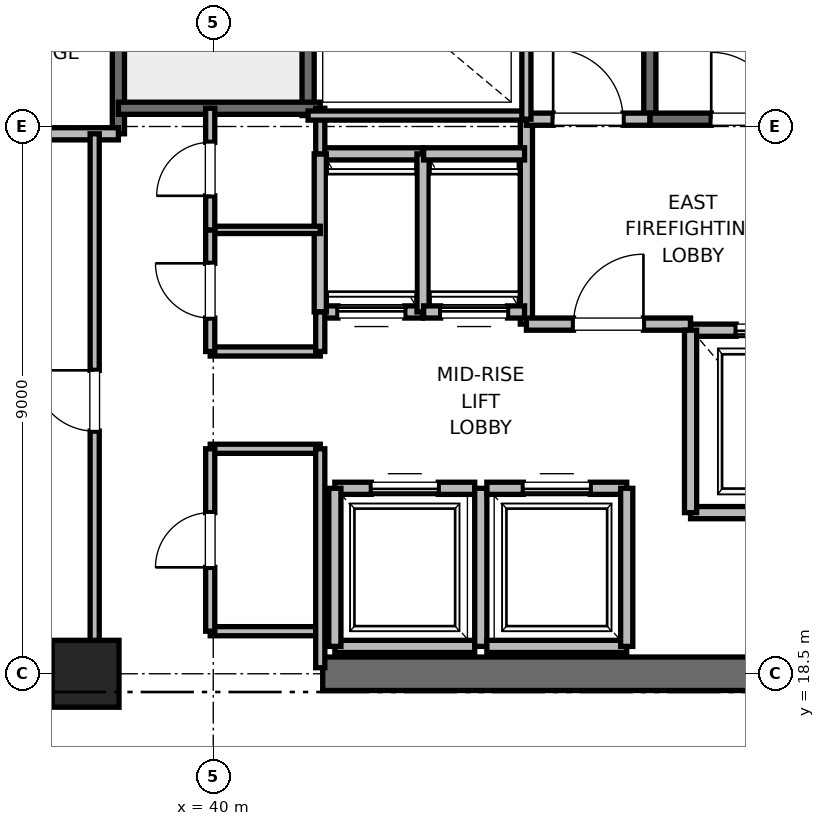
"""IFC4 building model, lengths in metres.
Left out: names, types, materials, properties, quantities, classifications, styles, units other than length and angle.
Written with IfcOpenShell. Run it as: python <this file> out.ifc"""

import sys

from ifc_helpers import new_model, si_unit, direction, frame, frame_2d, origin, origin_2d, place, context, subcontext, project, spatial, rectangle, extrude, element, fill, save


model = new_model("IFC4")
c1 = context("Model", 3, precision=1e-05, world=origin(), true_north=direction((0.0, 1.0)))
c2 = subcontext(c1, "Body", "Model", "MODEL_VIEW")
j1 = project(units=[si_unit("LENGTHUNIT", "METRE"), si_unit("PLANEANGLEUNIT", "RADIAN")], contexts=[c1])
p1 = place(None, origin())
s1 = spatial("IfcSite", under=j1, at=p1, CompositionType="ELEMENT")
p2 = place(p1, origin())
s2 = spatial("IfcBuilding", under=s1, at=p2, CompositionType="ELEMENT")
p3 = place(p2, frame((0.0, 0.0, 152.4)))
s3 = spatial("IfcBuildingStorey", under=s2, at=p3, CompositionType="ELEMENT", Elevation=152.4)
p4 = place(p3, frame((37.9, 18.5, 0.0), z_axis=(0.0, 0.0, 1.0), x_axis=(1.0, 0.0, 0.0)))
e1 = element("IfcColumn", 1, at=p4, inside=s3, PredefinedType="PILASTER", context=c2, shape_type="SweptSolid", body=[
    extrude(rectangle(XDim=1.1, YDim=1.1, at=origin_2d()), origin(), (0.0, 0.0, 1.0), 4.0),
])
for number, where, z_axis, x_axis in (
    (2, (29.0, 18.5, 0.0), (0.0, 0.0, 1.0), (1.0, 0.0, 0.0)),
    (3, (41.8, 18.5, 0.0), (0.0, 0.0, 1.0), (1.0, 0.0, 0.0)),
):
    element("IfcWall", number, at=place(p3, frame(where, z_axis=z_axis, x_axis=x_axis)), inside=s3, PredefinedType="SHEAR", context=c2, shape_type="SweptSolid", body=[
        extrude(rectangle(XDim=9.2, YDim=0.55, at=frame_2d((4.6, 0.0))), origin(), (0.0, 0.0, 1.0), 3.775),
    ])
p5 = place(p3, frame((47.18, 27.62, 0.0), z_axis=(0.0, 0.0, 1.0), x_axis=(0.0, 1.0, 0.0)))
e4 = element("IfcWall", 4, at=p5, inside=s3, PredefinedType="SOLIDWALL", context=c2, shape_type="SweptSolid", body=[
    extrude(rectangle(XDim=8.18, YDim=0.2, at=frame_2d((4.09, 0.0))), origin(), (0.0, 0.0, 1.0), 3.775),
])
p6 = place(p3, frame((47.18, 27.62, 0.0), z_axis=(0.0, 0.0, 1.0), x_axis=(1.0, 0.0, 0.0)))
e5 = element("IfcWall", 5, at=p6, inside=s3, PredefinedType="SOLIDWALL", context=c2, shape_type="SweptSolid", body=[
    extrude(rectangle(XDim=3.12, YDim=0.2, at=frame_2d((1.56, 0.0))), origin(), (0.0, 0.0, 1.0), 3.775),
])
p7 = place(p6, frame((1.01, 0.0, 0.0)))
e6 = element("IfcOpeningElement", 6, at=p7, cuts=e5, PredefinedType="OPENING", context=c2, shape_type="SweptSolid", body=[
    extrude(rectangle(XDim=1.1, YDim=2.15, at=frame_2d((0.55, 1.075))), frame((0.0, 0.1, 0.0), z_axis=(0.0, -1.0, 0.0), x_axis=(1.0, 0.0, 0.0)), (0.0, 0.0, 1.0), 0.2),
])
p8 = place(p3, frame((38.44, 27.38, 0.0), z_axis=(0.0, 0.0, 1.0), x_axis=(0.0, 1.0, 0.0)))
e7 = element("IfcWall", 7, at=p8, inside=s3, PredefinedType="SOLIDWALL", context=c2, shape_type="SweptSolid", body=[
    extrude(rectangle(XDim=8.87, YDim=0.2, at=frame_2d((4.435, 0.0))), origin(), (0.0, 0.0, 1.0), 3.775),
])
p9 = place(p3, frame((41.56, 27.68, 0.0), z_axis=(0.0, 0.0, 1.0), x_axis=(0.0, 1.0, 0.0)))
e8 = element("IfcWall", 8, at=p9, inside=s3, PredefinedType="SOLIDWALL", context=c2, shape_type="SweptSolid", body=[
    extrude(rectangle(XDim=8.57, YDim=0.2, at=frame_2d((4.285, 0.0))), origin(), (0.0, 0.0, 1.0), 3.775),
])
p10 = place(p3, frame((38.44, 27.8, 0.0), z_axis=(0.0, 0.0, 1.0), x_axis=(1.0, 0.0, 0.0)))
e9 = element("IfcWall", 9, at=p10, inside=s3, PredefinedType="SOLIDWALL", context=c2, shape_type="SweptSolid", body=[
    extrude(rectangle(XDim=3.32, YDim=0.2, at=frame_2d((1.66, 0.0))), origin(), (0.0, 0.0, 1.0), 3.775),
])
p11 = place(p3, frame((32.82, 27.38, 0.0), z_axis=(0.0, 0.0, 1.0), x_axis=(1.0, 0.0, 0.0)))
e10 = element("IfcWall", 10, at=p11, inside=s3, PredefinedType="PARTITIONING", context=c2, shape_type="SweptSolid", body=[
    extrude(rectangle(XDim=5.62, YDim=0.2, at=frame_2d((2.81, 0.0))), origin(), (0.0, 0.0, 1.0), 3.775),
])
p12 = place(p3, frame((45.15, 24.25, 0.0), z_axis=(0.0, 0.0, 1.0), x_axis=(0.0, 1.0, 0.0)))
e11 = element("IfcWall", 11, at=p12, inside=s3, PredefinedType="PARTITIONING", context=c2, shape_type="SweptSolid", body=[
    extrude(rectangle(XDim=3.37, YDim=0.2, at=frame_2d((1.685, 0.0))), origin(), (0.0, 0.0, 1.0), 3.775),
])
p13 = place(p3, frame((45.15, 24.25, 0.0), z_axis=(0.0, 0.0, 1.0), x_axis=(1.0, 0.0, 0.0)))
e12 = element("IfcWall", 12, at=p13, inside=s3, PredefinedType="PARTITIONING", context=c2, shape_type="SweptSolid", body=[
    extrude(rectangle(XDim=2.7, YDim=0.2, at=frame_2d((1.35, 0.0))), origin(), (0.0, 0.0, 1.0), 3.775),
])
p14 = place(p13, frame((0.775, 0.0, 0.0)))
e13 = element("IfcOpeningElement", 13, at=p14, cuts=e12, PredefinedType="OPENING", context=c2, shape_type="SweptSolid", body=[
    extrude(rectangle(XDim=1.15, YDim=2.2, at=frame_2d((0.575, 1.1))), frame((0.0, 0.1, 0.0), z_axis=(0.0, -1.0, 0.0), x_axis=(1.0, 0.0, 0.0)), (0.0, 0.0, 1.0), 0.2),
])
p15 = place(p3, frame((45.15, 27.62, 0.0), z_axis=(0.0, 0.0, 1.0), x_axis=(1.0, 0.0, 0.0)))
e14 = element("IfcWall", 14, at=p15, inside=s3, PredefinedType="PARTITIONING", context=c2, shape_type="SweptSolid", body=[
    extrude(rectangle(XDim=2.03, YDim=0.2, at=frame_2d((1.015, 0.0))), origin(), (0.0, 0.0, 1.0), 3.775),
])
p16 = place(p15, frame((0.44, 0.0, 0.0)))
e15 = element("IfcOpeningElement", 15, at=p16, cuts=e14, PredefinedType="OPENING", context=c2, shape_type="SweptSolid", body=[
    extrude(rectangle(XDim=1.15, YDim=2.2, at=frame_2d((0.575, 1.1))), frame((0.0, 0.1, 0.0), z_axis=(0.0, -1.0, 0.0), x_axis=(1.0, 0.0, 0.0)), (0.0, 0.0, 1.0), 0.2),
])
p17 = place(p3, frame((47.85, 21.15, 0.0), z_axis=(0.0, 0.0, 1.0), x_axis=(1.0, 0.0, 0.0)))
e16 = element("IfcWall", 16, at=p17, inside=s3, PredefinedType="SOLIDWALL", context=c2, shape_type="SweptSolid", body=[
    extrude(rectangle(XDim=2.6, YDim=0.2, at=frame_2d((1.3, 0.0))), origin(), (0.0, 0.0, 1.0), 3.775),
])
p18 = place(p3, frame((50.45, 24.15, 0.0), z_axis=(0.0, 0.0, 1.0), x_axis=(-1.0, 0.0, 0.0)))
e17 = element("IfcWall", 17, at=p18, inside=s3, PredefinedType="SOLIDWALL", context=c2, shape_type="SweptSolid", body=[
    extrude(rectangle(XDim=2.6, YDim=0.2, at=frame_2d((1.3, 0.0))), origin(), (0.0, 0.0, 1.0), 2.755),
])
p19 = place(p18, frame((0.75, 0.0, 0.0)))
e18 = element("IfcOpeningElement", 18, at=p19, cuts=e17, PredefinedType="OPENING", context=c2, shape_type="SweptSolid", body=[
    extrude(rectangle(XDim=1.1, YDim=2.2, at=frame_2d((0.55, 1.1))), frame((0.0, 0.1, 0.0), z_axis=(0.0, -1.0, 0.0), x_axis=(1.0, 0.0, 0.0)), (0.0, 0.0, 1.0), 0.2),
])
p20 = place(p3, frame((47.85, 24.15, 0.0), z_axis=(0.0, 0.0, 1.0), x_axis=(0.0, -1.0, 0.0)))
e19 = element("IfcWall", 19, at=p20, inside=s3, PredefinedType="SOLIDWALL", context=c2, shape_type="SweptSolid", body=[
    extrude(rectangle(XDim=3.0, YDim=0.2, at=frame_2d((1.5, 0.0))), origin(), (0.0, 0.0, 1.0), 3.775),
])
p21 = place(p3, frame((42.0, 18.95, 0.0), z_axis=(0.0, 0.0, 1.0), x_axis=(1.0, 0.0, 0.0)))
e20 = element("IfcWall", 20, at=p21, inside=s3, PredefinedType="SOLIDWALL", context=c2, shape_type="SweptSolid", body=[
    extrude(rectangle(XDim=2.3, YDim=0.2, at=frame_2d((1.15, 0.0))), origin(), (0.0, 0.0, 1.0), 2.755),
])
p22 = place(p3, frame((44.3, 21.55, 0.0), z_axis=(0.0, 0.0, 1.0), x_axis=(-1.0, 0.0, 0.0)))
e21 = element("IfcWall", 21, at=p22, inside=s3, PredefinedType="SOLIDWALL", context=c2, shape_type="SweptSolid", body=[
    extrude(rectangle(XDim=2.3, YDim=0.2, at=frame_2d((1.15, 0.0))), origin(), (0.0, 0.0, 1.0), 3.775),
])
p23 = place(p22, frame((0.6, 0.0, 0.0)))
e22 = element("IfcOpeningElement", 22, at=p23, cuts=e21, PredefinedType="OPENING", context=c2, shape_type="SweptSolid", body=[
    extrude(rectangle(XDim=1.1, YDim=2.2, at=frame_2d((0.55, 1.1))), frame((0.0, 0.1, 0.0), z_axis=(0.0, -1.0, 0.0), x_axis=(1.0, 0.0, 0.0)), (0.0, 0.0, 1.0), 0.2),
])
p24 = place(p3, frame((42.0, 21.55, 0.0), z_axis=(0.0, 0.0, 1.0), x_axis=(0.0, -1.0, 0.0)))
e23 = element("IfcWall", 23, at=p24, inside=s3, PredefinedType="SOLIDWALL", context=c2, shape_type="SweptSolid", body=[
    extrude(rectangle(XDim=2.6, YDim=0.2, at=frame_2d((1.3, 0.0))), origin(), (0.0, 0.0, 1.0), 2.755),
])
p25 = place(p3, frame((44.4, 18.95, 0.0), z_axis=(0.0, 0.0, 1.0), x_axis=(0.0, 1.0, 0.0)))
e24 = element("IfcWall", 24, at=p25, inside=s3, PredefinedType="SOLIDWALL", context=c2, shape_type="SweptSolid", body=[
    extrude(rectangle(XDim=2.6, YDim=0.2, at=frame_2d((1.3, 0.0))), origin(), (0.0, 0.0, 1.0), 3.775),
])
p26 = place(p3, frame((44.5, 18.95, 0.0), z_axis=(0.0, 0.0, 1.0), x_axis=(1.0, 0.0, 0.0)))
e25 = element("IfcWall", 25, at=p26, inside=s3, PredefinedType="SOLIDWALL", context=c2, shape_type="SweptSolid", body=[
    extrude(rectangle(XDim=2.3, YDim=0.2, at=frame_2d((1.15, 0.0))), origin(), (0.0, 0.0, 1.0), 3.775),
])
p27 = place(p3, frame((46.8, 21.55, 0.0), z_axis=(0.0, 0.0, 1.0), x_axis=(-1.0, 0.0, 0.0)))
e26 = element("IfcWall", 26, at=p27, inside=s3, PredefinedType="SOLIDWALL", context=c2, shape_type="SweptSolid", body=[
    extrude(rectangle(XDim=2.3, YDim=0.2, at=frame_2d((1.15, 0.0))), origin(), (0.0, 0.0, 1.0), 3.775),
])
p28 = place(p27, frame((0.6, 0.0, 0.0)))
e27 = element("IfcOpeningElement", 27, at=p28, cuts=e26, PredefinedType="OPENING", context=c2, shape_type="SweptSolid", body=[
    extrude(rectangle(XDim=1.1, YDim=2.2, at=frame_2d((0.55, 1.1))), frame((0.0, 0.1, 0.0), z_axis=(0.0, -1.0, 0.0), x_axis=(1.0, 0.0, 0.0)), (0.0, 0.0, 1.0), 0.2),
])
p29 = place(p3, frame((46.8, 18.95, 0.0), z_axis=(0.0, 0.0, 1.0), x_axis=(0.0, 1.0, 0.0)))
e28 = element("IfcWall", 28, at=p29, inside=s3, PredefinedType="SOLIDWALL", context=c2, shape_type="SweptSolid", body=[
    extrude(rectangle(XDim=2.6, YDim=0.2, at=frame_2d((1.3, 0.0))), origin(), (0.0, 0.0, 1.0), 3.775),
])
p30 = place(p3, frame((41.76, 24.45, 0.0), z_axis=(0.0, 0.0, 1.0), x_axis=(1.0, 0.0, 0.0)))
e29 = element("IfcWall", 29, at=p30, inside=s3, PredefinedType="SOLIDWALL", context=c2, shape_type="SweptSolid", body=[
    extrude(rectangle(XDim=1.68, YDim=0.2, at=frame_2d((0.84, 0.0))), origin(), (0.0, 0.0, 1.0), 3.775),
])
p31 = place(p30, frame((0.29, 0.0, 0.0)))
e30 = element("IfcOpeningElement", 30, at=p31, cuts=e29, PredefinedType="OPENING", context=c2, shape_type="SweptSolid", body=[
    extrude(rectangle(XDim=1.1, YDim=2.2, at=frame_2d((0.55, 1.1))), frame((0.0, 0.1, 0.0), z_axis=(0.0, -1.0, 0.0), x_axis=(1.0, 0.0, 0.0)), (0.0, 0.0, 1.0), 0.2),
])
p32 = place(p3, frame((43.44, 27.05, 0.0), z_axis=(0.0, 0.0, 1.0), x_axis=(-1.0, 0.0, 0.0)))
e31 = element("IfcWall", 31, at=p32, inside=s3, PredefinedType="SOLIDWALL", context=c2, shape_type="SweptSolid", body=[
    extrude(rectangle(XDim=1.68, YDim=0.2, at=frame_2d((0.84, 0.0))), origin(), (0.0, 0.0, 1.0), 3.775),
])
for number, where, z_axis, x_axis in (
    (32, (41.76, 27.05, 0.0), (0.0, 0.0, 1.0), (0.0, -1.0, 0.0)),
    (33, (43.45, 24.45, 0.0), (0.0, 0.0, 1.0), (0.0, 1.0, 0.0)),
):
    element("IfcWall", number, at=place(p3, frame(where, z_axis=z_axis, x_axis=x_axis)), inside=s3, PredefinedType="SOLIDWALL", context=c2, shape_type="SweptSolid", body=[
        extrude(rectangle(XDim=2.6, YDim=0.2, at=frame_2d((1.3, 0.0))), origin(), (0.0, 0.0, 1.0), 3.775),
    ])
p33 = place(p3, frame((43.46, 24.45, 0.0), z_axis=(0.0, 0.0, 1.0), x_axis=(1.0, 0.0, 0.0)))
e34 = element("IfcWall", 34, at=p33, inside=s3, PredefinedType="SOLIDWALL", context=c2, shape_type="SweptSolid", body=[
    extrude(rectangle(XDim=1.66, YDim=0.2, at=frame_2d((0.83, 0.0))), origin(), (0.0, 0.0, 1.0), 3.775),
])
p34 = place(p33, frame((0.28, 0.0, 0.0)))
e35 = element("IfcOpeningElement", 35, at=p34, cuts=e34, PredefinedType="OPENING", context=c2, shape_type="SweptSolid", body=[
    extrude(rectangle(XDim=1.1, YDim=2.2, at=frame_2d((0.55, 1.1))), frame((0.0, 0.1, 0.0), z_axis=(0.0, -1.0, 0.0), x_axis=(1.0, 0.0, 0.0)), (0.0, 0.0, 1.0), 0.2),
])
p35 = place(p3, frame((45.12, 27.05, 0.0), z_axis=(0.0, 0.0, 1.0), x_axis=(-1.0, 0.0, 0.0)))
e36 = element("IfcWall", 36, at=p35, inside=s3, PredefinedType="SOLIDWALL", context=c2, shape_type="SweptSolid", body=[
    extrude(rectangle(XDim=1.66, YDim=0.2, at=frame_2d((0.83, 0.0))), origin(), (0.0, 0.0, 1.0), 3.775),
])
for number, where, z_axis, x_axis in (
    (37, (39.95, 19.2, 0.0), (0.0, 0.0, 1.0), (1.0, 0.0, 0.0)),
    (38, (39.95, 22.2, 0.0), (0.0, 0.0, 1.0), (1.0, 0.0, 0.0)),
    (39, (39.95, 23.8, 0.0), (0.0, 0.0, 1.0), (1.0, 0.0, 0.0)),
):
    element("IfcWall", number, at=place(p3, frame(where, z_axis=z_axis, x_axis=x_axis)), inside=s3, PredefinedType="PARTITIONING", context=c2, shape_type="SweptSolid", body=[
        extrude(rectangle(XDim=1.81, YDim=0.15, at=frame_2d((0.905, 0.0))), origin(), (0.0, 0.0, 1.0), 2.85),
    ])
p36 = place(p3, frame((39.95, 25.8, 0.0), z_axis=(0.0, 0.0, 1.0), x_axis=(1.0, 0.0, 0.0)))
e40 = element("IfcWall", 40, at=p36, inside=s3, PredefinedType="PARTITIONING", context=c2, shape_type="SweptSolid", body=[
    extrude(rectangle(XDim=1.81, YDim=0.12, at=frame_2d((0.905, 0.0))), origin(), (0.0, 0.0, 1.0), 2.85),
])
p37 = place(p3, frame((41.76, 18.6, 0.0), z_axis=(0.0, 0.0, 1.0), x_axis=(0.0, 1.0, 0.0)))
e41 = element("IfcWall", 41, at=p37, inside=s3, PredefinedType="PARTITIONING", context=c2, shape_type="SweptSolid", body=[
    extrude(rectangle(XDim=3.6, YDim=0.15, at=frame_2d((1.8, 0.0))), origin(), (0.0, 0.0, 1.0), 2.755),
])
p38 = place(p3, frame((41.76, 23.8, 0.0), z_axis=(0.0, 0.0, 1.0), x_axis=(0.0, 1.0, 0.0)))
e42 = element("IfcWall", 42, at=p38, inside=s3, PredefinedType="PARTITIONING", context=c2, shape_type="SweptSolid", body=[
    extrude(rectangle(XDim=0.65, YDim=0.15, at=frame_2d((0.325, 0.0))), origin(), (0.0, 0.0, 1.0), 2.85),
])
p39 = place(p3, frame((41.76, 27.05, 0.0), z_axis=(0.0, 0.0, 1.0), x_axis=(0.0, 1.0, 0.0)))
e43 = element("IfcWall", 43, at=p39, inside=s3, PredefinedType="PARTITIONING", context=c2, shape_type="SweptSolid", body=[
    extrude(rectangle(XDim=0.75, YDim=0.15, at=frame_2d((0.375, 0.0))), origin(), (0.0, 0.0, 1.0), 2.85),
])
p40 = place(p3, frame((39.95, 19.2, 0.0), z_axis=(0.0, 0.0, 1.0), x_axis=(0.0, 1.0, 0.0)))
e44 = element("IfcWall", 44, at=p40, inside=s3, PredefinedType="PARTITIONING", context=c2, shape_type="SweptSolid", body=[
    extrude(rectangle(XDim=3.0, YDim=0.15, at=frame_2d((1.5, 0.0))), origin(), (0.0, 0.0, 1.0), 2.85),
])
p41 = place(p40, frame((1.05, 0.0, 0.0)))
e45 = element("IfcOpeningElement", 45, at=p41, cuts=e44, PredefinedType="OPENING", context=c2, shape_type="SweptSolid", body=[
    extrude(rectangle(XDim=0.9, YDim=2.1, at=frame_2d((0.45, 1.05))), frame((0.0, 0.075, 0.0), z_axis=(0.0, -1.0, 0.0), x_axis=(1.0, 0.0, 0.0)), (0.0, 0.0, 1.0), 0.15),
])
p42 = place(p3, frame((39.95, 23.8, 0.0), z_axis=(0.0, 0.0, 1.0), x_axis=(0.0, 1.0, 0.0)))
e46 = element("IfcWall", 46, at=p42, inside=s3, PredefinedType="PARTITIONING", context=c2, shape_type="SweptSolid", body=[
    extrude(rectangle(XDim=2.0, YDim=0.15, at=frame_2d((1.0, 0.0))), origin(), (0.0, 0.0, 1.0), 2.85),
])
p43 = place(p42, frame((0.55, 0.0, 0.0)))
e47 = element("IfcOpeningElement", 47, at=p43, cuts=e46, PredefinedType="OPENING", context=c2, shape_type="SweptSolid", body=[
    extrude(rectangle(XDim=0.9, YDim=2.1, at=frame_2d((0.45, 1.05))), frame((0.0, 0.075, 0.0), z_axis=(0.0, -1.0, 0.0), x_axis=(1.0, 0.0, 0.0)), (0.0, 0.0, 1.0), 0.15),
])
p44 = place(p3, frame((39.95, 25.8, 0.0), z_axis=(0.0, 0.0, 1.0), x_axis=(0.0, 1.0, 0.0)))
e48 = element("IfcWall", 48, at=p44, inside=s3, PredefinedType="PARTITIONING", context=c2, shape_type="SweptSolid", body=[
    extrude(rectangle(XDim=2.0, YDim=0.15, at=frame_2d((1.0, 0.0))), origin(), (0.0, 0.0, 1.0), 2.85),
])
p45 = place(p44, frame((0.56, 0.0, 0.0)))
e49 = element("IfcOpeningElement", 49, at=p45, cuts=e48, PredefinedType="OPENING", context=c2, shape_type="SweptSolid", body=[
    extrude(rectangle(XDim=0.88, YDim=2.1, at=frame_2d((0.44, 1.05))), frame((0.0, 0.075, 0.0), z_axis=(0.0, -1.0, 0.0), x_axis=(1.0, 0.0, 0.0)), (0.0, 0.0, 1.0), 0.15),
])
p46 = place(p3, frame((38.05, 18.6, 0.0), z_axis=(0.0, 0.0, 1.0), x_axis=(0.0, 1.0, 0.0)))
e50 = element("IfcWall", 50, at=p46, inside=s3, PredefinedType="PARTITIONING", context=c2, shape_type="SweptSolid", body=[
    extrude(rectangle(XDim=8.78, YDim=0.15, at=frame_2d((4.39, 0.0))), origin(), (0.0, 0.0, 1.0), 2.755),
])
p47 = place(p46, frame((3.89, 0.0, 0.0)))
e51 = element("IfcOpeningElement", 51, at=p47, cuts=e50, PredefinedType="OPENING", context=c2, shape_type="SweptSolid", body=[
    extrude(rectangle(XDim=1.0, YDim=2.15, at=frame_2d((0.5, 1.075))), frame((0.0, 0.075, 0.0), z_axis=(0.0, -1.0, 0.0), x_axis=(1.0, 0.0, 0.0)), (0.0, 0.0, 1.0), 0.15),
])
p48 = place(p3, frame((41.56, 27.68, 0.0), z_axis=(0.0, 0.0, 1.0), x_axis=(1.0, 0.0, 0.0)))
e52 = element("IfcWall", 52, at=p48, inside=s3, PredefinedType="PARTITIONING", context=c2, shape_type="SweptSolid", body=[
    extrude(rectangle(XDim=3.59, YDim=0.15, at=frame_2d((1.795, 0.0))), origin(), (0.0, 0.0, 1.0), 2.85),
])
p49 = place(p3, frame((45.15, 27.62, 0.0), z_axis=(0.0, 0.0, 1.0), x_axis=(0.0, 1.0, 0.0)))
e53 = element("IfcWall", 53, at=p49, inside=s3, PredefinedType="PARTITIONING", context=c2, shape_type="SweptSolid", body=[
    extrude(rectangle(XDim=3.1, YDim=0.15, at=frame_2d((1.55, 0.0))), origin(), (0.0, 0.0, 1.0), 2.85),
])
p50 = place(p7, origin())
e54 = element("IfcDoor", 54, at=p50, inside=s3, OperationType="SINGLE_SWING_LEFT", PredefinedType="DOOR", context=c2, shape_type="SweptSolid", body=[
    extrude(rectangle(XDim=1.1, YDim=2.15, at=frame_2d((0.55, 1.075))), frame((0.0, 0.025, 0.0), z_axis=(0.0, -1.0, 0.0), x_axis=(1.0, 0.0, 0.0)), (0.0, 0.0, 1.0), 0.05),
])
fill(e6, e54)
p51 = place(p14, origin())
e55 = element("IfcDoor", 55, at=p51, inside=s3, OperationType="SINGLE_SWING_RIGHT", PredefinedType="DOOR", context=c2, shape_type="SweptSolid", body=[
    extrude(rectangle(XDim=1.15, YDim=2.2, at=frame_2d((0.575, 1.1))), frame((0.0, 0.025, 0.0), z_axis=(0.0, -1.0, 0.0), x_axis=(1.0, 0.0, 0.0)), (0.0, 0.0, 1.0), 0.05),
])
fill(e13, e55)
p52 = place(p16, origin())
e56 = element("IfcDoor", 56, at=p52, inside=s3, OperationType="SINGLE_SWING_LEFT", PredefinedType="DOOR", context=c2, shape_type="SweptSolid", body=[
    extrude(rectangle(XDim=1.15, YDim=2.2, at=frame_2d((0.575, 1.1))), frame((0.0, 0.025, 0.0), z_axis=(0.0, -1.0, 0.0), x_axis=(1.0, 0.0, 0.0)), (0.0, 0.0, 1.0), 0.05),
])
fill(e15, e56)
p53 = place(p19, origin())
e57 = element("IfcDoor", 57, at=p53, inside=s3, OperationType="SLIDING_TO_RIGHT", PredefinedType="DOOR", context=c2, shape_type="SweptSolid", body=[
    extrude(rectangle(XDim=1.1, YDim=2.2, at=frame_2d((0.55, 1.1))), frame((0.0, 0.025, 0.0), z_axis=(0.0, -1.0, 0.0), x_axis=(1.0, 0.0, 0.0)), (0.0, 0.0, 1.0), 0.05),
])
fill(e18, e57)
p54 = place(p23, origin())
e58 = element("IfcDoor", 58, at=p54, inside=s3, OperationType="SLIDING_TO_RIGHT", PredefinedType="DOOR", context=c2, shape_type="SweptSolid", body=[
    extrude(rectangle(XDim=1.1, YDim=2.2, at=frame_2d((0.55, 1.1))), frame((0.0, 0.025, 0.0), z_axis=(0.0, -1.0, 0.0), x_axis=(1.0, 0.0, 0.0)), (0.0, 0.0, 1.0), 0.05),
])
fill(e22, e58)
p55 = place(p28, origin())
e59 = element("IfcDoor", 59, at=p55, inside=s3, OperationType="SLIDING_TO_RIGHT", PredefinedType="DOOR", context=c2, shape_type="SweptSolid", body=[
    extrude(rectangle(XDim=1.1, YDim=2.2, at=frame_2d((0.55, 1.1))), frame((0.0, 0.025, 0.0), z_axis=(0.0, -1.0, 0.0), x_axis=(1.0, 0.0, 0.0)), (0.0, 0.0, 1.0), 0.05),
])
fill(e27, e59)
p56 = place(p31, origin())
e60 = element("IfcDoor", 60, at=p56, inside=s3, OperationType="SLIDING_TO_RIGHT", PredefinedType="DOOR", context=c2, shape_type="SweptSolid", body=[
    extrude(rectangle(XDim=1.1, YDim=2.2, at=frame_2d((0.55, 1.1))), frame((0.0, 0.025, 0.0), z_axis=(0.0, -1.0, 0.0), x_axis=(1.0, 0.0, 0.0)), (0.0, 0.0, 1.0), 0.05),
])
fill(e30, e60)
p57 = place(p34, origin())
e61 = element("IfcDoor", 61, at=p57, inside=s3, OperationType="SLIDING_TO_RIGHT", PredefinedType="DOOR", context=c2, shape_type="SweptSolid", body=[
    extrude(rectangle(XDim=1.1, YDim=2.2, at=frame_2d((0.55, 1.1))), frame((0.0, 0.025, 0.0), z_axis=(0.0, -1.0, 0.0), x_axis=(1.0, 0.0, 0.0)), (0.0, 0.0, 1.0), 0.05),
])
fill(e35, e61)
p58 = place(p41, origin())
e62 = element("IfcDoor", 62, at=p58, inside=s3, OperationType="SINGLE_SWING_LEFT", PredefinedType="DOOR", context=c2, shape_type="SweptSolid", body=[
    extrude(rectangle(XDim=0.9, YDim=2.1, at=frame_2d((0.45, 1.05))), frame((0.0, 0.025, 0.0), z_axis=(0.0, -1.0, 0.0), x_axis=(1.0, 0.0, 0.0)), (0.0, 0.0, 1.0), 0.05),
])
fill(e45, e62)
p59 = place(p43, origin())
e63 = element("IfcDoor", 63, at=p59, inside=s3, OperationType="SINGLE_SWING_RIGHT", PredefinedType="DOOR", context=c2, shape_type="SweptSolid", body=[
    extrude(rectangle(XDim=0.9, YDim=2.1, at=frame_2d((0.45, 1.05))), frame((0.0, 0.025, 0.0), z_axis=(0.0, -1.0, 0.0), x_axis=(1.0, 0.0, 0.0)), (0.0, 0.0, 1.0), 0.05),
])
fill(e47, e63)
p60 = place(p45, origin())
e64 = element("IfcDoor", 64, at=p60, inside=s3, OperationType="SINGLE_SWING_LEFT", PredefinedType="DOOR", context=c2, shape_type="SweptSolid", body=[
    extrude(rectangle(XDim=0.88, YDim=2.1, at=frame_2d((0.44, 1.05))), frame((0.0, 0.025, 0.0), z_axis=(0.0, -1.0, 0.0), x_axis=(1.0, 0.0, 0.0)), (0.0, 0.0, 1.0), 0.05),
])
fill(e49, e64)
p61 = place(p47, origin())
e65 = element("IfcDoor", 65, at=p61, inside=s3, OperationType="SINGLE_SWING_RIGHT", PredefinedType="DOOR", context=c2, shape_type="SweptSolid", body=[
    extrude(rectangle(XDim=1.0, YDim=2.15, at=frame_2d((0.5, 1.075))), frame((0.0, 0.025, 0.0), z_axis=(0.0, -1.0, 0.0), x_axis=(1.0, 0.0, 0.0)), (0.0, 0.0, 1.0), 0.05),
])
fill(e51, e65)
save(model, sys.argv[1])
